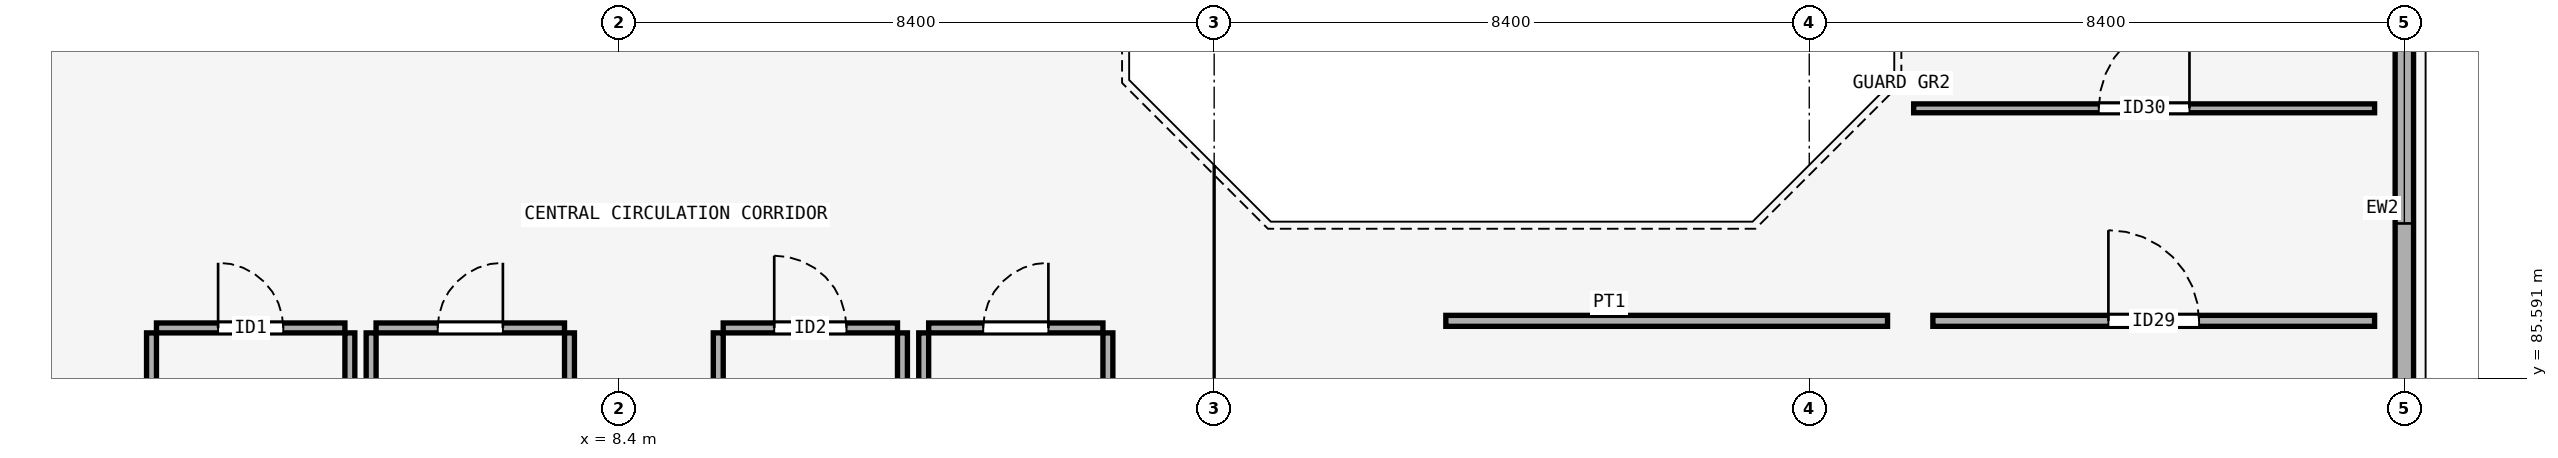
"""IFC4 building model, lengths in metres.
Left out: names, types, materials, properties, quantities, classifications, styles, units other than length and angle.
Written with IfcOpenShell. Run it as: python <this file> out.ifc"""

import sys

from ifc_helpers import new_model, si_unit, direction, frame, frame_2d, origin, place, context, subcontext, project, spatial, rectangle, extrude, element, fill, save


model = new_model("IFC4")
c1 = context("Model", 3, precision=1e-05, world=origin(), true_north=direction((0.0, 1.0)))
c2 = subcontext(c1, "Body", "Model", "MODEL_VIEW")
j1 = project(units=[si_unit("LENGTHUNIT", "METRE"), si_unit("PLANEANGLEUNIT", "RADIAN")], contexts=[c1])
p1 = place(None, origin())
s1 = spatial("IfcSite", under=j1, at=p1, CompositionType="ELEMENT")
p2 = place(p1, origin())
s2 = spatial("IfcBuilding", under=s1, at=p2, CompositionType="ELEMENT")
p3 = place(p2, frame((0.0, 0.0, 32.4)))
s3 = spatial("IfcBuildingStorey", under=s2, at=p3, CompositionType="ELEMENT", Elevation=32.4)
p4 = place(p3, frame((33.6, 85.125, 0.0), z_axis=(0.0, 0.0, 1.0), x_axis=(0.0, 1.0, 0.0)))
e1 = element("IfcWall", 1, at=p4, inside=s3, PredefinedType="SOLIDWALL", context=c2, shape_type="SweptSolid", body=[
    extrude(rectangle(XDim=7.75, YDim=0.26, at=frame_2d((3.875, 0.0))), origin(), (0.0, 0.0, 1.0), 3.49),
])
p5 = place(p4, frame((2.65, 0.0, 0.95)))
e2 = element("IfcOpeningElement", 2, at=p5, cuts=e1, PredefinedType="OPENING", context=c2, shape_type="SweptSolid", body=[
    extrude(rectangle(XDim=2.45, YDim=1.85, at=frame_2d((1.225, 0.925))), frame((0.0, 0.14, 0.0), z_axis=(0.0, -1.0, 0.0), x_axis=(1.0, 0.0, 0.0)), (0.0, 0.0, 1.0), 0.28),
])
p6 = place(p3, frame((1.87, 86.3, 0.0), z_axis=(0.0, 0.0, 1.0), x_axis=(1.0, 0.0, 0.0)))
e3 = element("IfcWall", 3, at=p6, inside=s3, PredefinedType="PARTITIONING", context=c2, shape_type="SweptSolid", body=[
    extrude(rectangle(XDim=2.66, YDim=0.14, at=frame_2d((1.33, 0.0))), origin(), (0.0, 0.0, 1.0), 4.24),
])
p7 = place(p6, frame((0.87, 0.0, 0.0)))
e4 = element("IfcOpeningElement", 4, at=p7, cuts=e3, PredefinedType="OPENING", context=c2, shape_type="SweptSolid", body=[
    extrude(rectangle(XDim=0.92, YDim=2.12, at=frame_2d((0.46, 1.06))), frame((0.0, 0.08, 0.0), z_axis=(0.0, -1.0, 0.0), x_axis=(1.0, 0.0, 0.0)), (0.0, 0.0, 1.0), 0.16),
])
for number, where, z_axis, x_axis in (
    (5, (1.8, 83.87, 0.0), (0.0, 0.0, 1.0), (0.0, 1.0, 0.0)),
    (6, (4.6, 83.87, 0.0), (0.0, 0.0, 1.0), (0.0, 1.0, 0.0)),
):
    element("IfcWall", number, at=place(p3, frame(where, z_axis=z_axis, x_axis=x_axis)), inside=s3, PredefinedType="PARTITIONING", context=c2, shape_type="SweptSolid", body=[
        extrude(rectangle(XDim=2.36, YDim=0.14, at=frame_2d((1.18, 0.0))), origin(), (0.0, 0.0, 1.0), 3.49),
    ])
p8 = place(p3, frame((4.97, 86.3, 0.0), z_axis=(0.0, 0.0, 1.0), x_axis=(1.0, 0.0, 0.0)))
e7 = element("IfcWall", 7, at=p8, inside=s3, PredefinedType="PARTITIONING", context=c2, shape_type="SweptSolid", body=[
    extrude(rectangle(XDim=2.66, YDim=0.14, at=frame_2d((1.33, 0.0))), origin(), (0.0, 0.0, 1.0), 4.24),
])
p9 = place(p8, frame((0.87, 0.0, 0.0)))
e8 = element("IfcOpeningElement", 8, at=p9, cuts=e7, PredefinedType="OPENING", context=c2, shape_type="SweptSolid", body=[
    extrude(rectangle(XDim=0.92, YDim=2.12, at=frame_2d((0.46, 1.06))), frame((0.0, 0.08, 0.0), z_axis=(0.0, -1.0, 0.0), x_axis=(1.0, 0.0, 0.0)), (0.0, 0.0, 1.0), 0.16),
])
for number, where, z_axis, x_axis in (
    (9, (4.9, 83.87, 0.0), (0.0, 0.0, 1.0), (0.0, 1.0, 0.0)),
    (10, (7.7, 83.87, 0.0), (0.0, 0.0, 1.0), (0.0, 1.0, 0.0)),
):
    element("IfcWall", number, at=place(p3, frame(where, z_axis=z_axis, x_axis=x_axis)), inside=s3, PredefinedType="PARTITIONING", context=c2, shape_type="SweptSolid", body=[
        extrude(rectangle(XDim=2.36, YDim=0.14, at=frame_2d((1.18, 0.0))), origin(), (0.0, 0.0, 1.0), 3.49),
    ])
p10 = place(p3, frame((9.87, 86.3, 0.0), z_axis=(0.0, 0.0, 1.0), x_axis=(1.0, 0.0, 0.0)))
e11 = element("IfcWall", 11, at=p10, inside=s3, PredefinedType="PARTITIONING", context=c2, shape_type="SweptSolid", body=[
    extrude(rectangle(XDim=2.46, YDim=0.14, at=frame_2d((1.23, 0.0))), origin(), (0.0, 0.0, 1.0), 4.24),
])
p11 = place(p10, frame((0.72, 0.0, 0.0)))
e12 = element("IfcOpeningElement", 12, at=p11, cuts=e11, PredefinedType="OPENING", context=c2, shape_type="SweptSolid", body=[
    extrude(rectangle(XDim=1.02, YDim=2.15, at=frame_2d((0.51, 1.075))), frame((0.0, 0.08, 0.0), z_axis=(0.0, -1.0, 0.0), x_axis=(1.0, 0.0, 0.0)), (0.0, 0.0, 1.0), 0.16),
])
for number, where, z_axis, x_axis in (
    (13, (9.8, 83.87, 0.0), (0.0, 0.0, 1.0), (0.0, 1.0, 0.0)),
    (14, (12.4, 83.87, 0.0), (0.0, 0.0, 1.0), (0.0, 1.0, 0.0)),
):
    element("IfcWall", number, at=place(p3, frame(where, z_axis=z_axis, x_axis=x_axis)), inside=s3, PredefinedType="PARTITIONING", context=c2, shape_type="SweptSolid", body=[
        extrude(rectangle(XDim=2.36, YDim=0.14, at=frame_2d((1.18, 0.0))), origin(), (0.0, 0.0, 1.0), 3.49),
    ])
p12 = place(p3, frame((12.77, 86.3, 0.0), z_axis=(0.0, 0.0, 1.0), x_axis=(1.0, 0.0, 0.0)))
e15 = element("IfcWall", 15, at=p12, inside=s3, PredefinedType="PARTITIONING", context=c2, shape_type="SweptSolid", body=[
    extrude(rectangle(XDim=2.46, YDim=0.14, at=frame_2d((1.23, 0.0))), origin(), (0.0, 0.0, 1.0), 4.24),
])
p13 = place(p12, frame((0.77, 0.0, 0.0)))
e16 = element("IfcOpeningElement", 16, at=p13, cuts=e15, PredefinedType="OPENING", context=c2, shape_type="SweptSolid", body=[
    extrude(rectangle(XDim=0.92, YDim=2.12, at=frame_2d((0.46, 1.06))), frame((0.0, 0.08, 0.0), z_axis=(0.0, -1.0, 0.0), x_axis=(1.0, 0.0, 0.0)), (0.0, 0.0, 1.0), 0.16),
])
for number, where, z_axis, x_axis in (
    (17, (12.7, 83.87, 0.0), (0.0, 0.0, 1.0), (0.0, 1.0, 0.0)),
    (18, (15.3, 83.87, 0.0), (0.0, 0.0, 1.0), (0.0, 1.0, 0.0)),
):
    element("IfcWall", number, at=place(p3, frame(where, z_axis=z_axis, x_axis=x_axis)), inside=s3, PredefinedType="PARTITIONING", context=c2, shape_type="SweptSolid", body=[
        extrude(rectangle(XDim=2.36, YDim=0.14, at=frame_2d((1.18, 0.0))), origin(), (0.0, 0.0, 1.0), 3.49),
    ])
p14 = place(p3, frame((20.07, 86.4, 0.0), z_axis=(0.0, 0.0, 1.0), x_axis=(1.0, 0.0, 0.0)))
e19 = element("IfcWall", 19, at=p14, inside=s3, PredefinedType="PARTITIONING", context=c2, shape_type="SweptSolid", body=[
    extrude(rectangle(XDim=6.235, YDim=0.155, at=frame_2d((3.117, 0.0))), origin(), (0.0, 0.0, 1.0), 3.54),
])
p15 = place(p3, frame((26.945, 86.4, 0.0), z_axis=(0.0, 0.0, 1.0), x_axis=(1.0, 0.0, 0.0)))
e20 = element("IfcWall", 20, at=p15, inside=s3, PredefinedType="PARTITIONING", context=c2, shape_type="SweptSolid", body=[
    extrude(rectangle(XDim=6.235, YDim=0.155, at=frame_2d((3.117, 0.0))), origin(), (0.0, 0.0, 1.0), 4.24),
])
p16 = place(p15, frame((2.478, 0.0, 0.0)))
e21 = element("IfcOpeningElement", 21, at=p16, cuts=e20, PredefinedType="OPENING", context=c2, shape_type="SweptSolid", body=[
    extrude(rectangle(XDim=1.28, YDim=2.34, at=frame_2d((0.64, 1.17))), frame((0.0, 0.087, 0.0), z_axis=(0.0, -1.0, 0.0), x_axis=(1.0, 0.0, 0.0)), (0.0, 0.0, 1.0), 0.175),
])
p17 = place(p3, frame((26.674, 89.4, 0.0), z_axis=(0.0, 0.0, 1.0), x_axis=(1.0, 0.0, 0.0)))
e22 = element("IfcWall", 22, at=p17, inside=s3, PredefinedType="PARTITIONING", context=c2, shape_type="SweptSolid", body=[
    extrude(rectangle(XDim=6.506, YDim=0.125, at=frame_2d((3.253, 0.0))), origin(), (0.0, 0.0, 1.0), 4.24),
])
p18 = place(p17, frame((2.613, 0.0, 0.0)))
e23 = element("IfcOpeningElement", 23, at=p18, cuts=e22, PredefinedType="OPENING", context=c2, shape_type="SweptSolid", body=[
    extrude(rectangle(XDim=1.28, YDim=2.46, at=frame_2d((0.64, 1.23))), frame((0.0, 0.073, 0.0), z_axis=(0.0, -1.0, 0.0), x_axis=(1.0, 0.0, 0.0)), (0.0, 0.0, 1.0), 0.145),
])
p19 = place(p5, origin())
e24 = element("IfcWindow", 24, at=p19, inside=s3, PartitioningType="DOUBLE_PANEL_VERTICAL", PredefinedType="WINDOW", context=c2, shape_type="SweptSolid", body=[
    extrude(rectangle(XDim=2.45, YDim=1.85, at=frame_2d((1.225, 0.925))), frame((0.0, 0.03, 0.0), z_axis=(0.0, -1.0, 0.0), x_axis=(1.0, 0.0, 0.0)), (0.0, 0.0, 1.0), 0.06),
])
fill(e2, e24)
p20 = place(p7, origin())
e25 = element("IfcDoor", 25, at=p20, inside=s3, OperationType="SINGLE_SWING_LEFT", PredefinedType="DOOR", context=c2, shape_type="SweptSolid", body=[
    extrude(rectangle(XDim=0.92, YDim=2.12, at=frame_2d((0.46, 1.06))), frame((0.0, 0.025, 0.0), z_axis=(0.0, -1.0, 0.0), x_axis=(1.0, 0.0, 0.0)), (0.0, 0.0, 1.0), 0.05),
])
fill(e4, e25)
p21 = place(p9, origin())
e26 = element("IfcDoor", 26, at=p21, inside=s3, OperationType="SINGLE_SWING_RIGHT", PredefinedType="DOOR", context=c2, shape_type="SweptSolid", body=[
    extrude(rectangle(XDim=0.92, YDim=2.12, at=frame_2d((0.46, 1.06))), frame((0.0, 0.025, 0.0), z_axis=(0.0, -1.0, 0.0), x_axis=(1.0, 0.0, 0.0)), (0.0, 0.0, 1.0), 0.05),
])
fill(e8, e26)
p22 = place(p11, origin())
e27 = element("IfcDoor", 27, at=p22, inside=s3, OperationType="SINGLE_SWING_LEFT", PredefinedType="DOOR", context=c2, shape_type="SweptSolid", body=[
    extrude(rectangle(XDim=1.02, YDim=2.15, at=frame_2d((0.51, 1.075))), frame((0.0, 0.025, 0.0), z_axis=(0.0, -1.0, 0.0), x_axis=(1.0, 0.0, 0.0)), (0.0, 0.0, 1.0), 0.05),
])
fill(e12, e27)
p23 = place(p13, origin())
e28 = element("IfcDoor", 28, at=p23, inside=s3, OperationType="SINGLE_SWING_RIGHT", PredefinedType="DOOR", context=c2, shape_type="SweptSolid", body=[
    extrude(rectangle(XDim=0.92, YDim=2.12, at=frame_2d((0.46, 1.06))), frame((0.0, 0.025, 0.0), z_axis=(0.0, -1.0, 0.0), x_axis=(1.0, 0.0, 0.0)), (0.0, 0.0, 1.0), 0.05),
])
fill(e16, e28)
p24 = place(p16, origin())
e29 = element("IfcDoor", 29, at=p24, inside=s3, OperationType="SINGLE_SWING_LEFT", PredefinedType="DOOR", context=c2, shape_type="SweptSolid", body=[
    extrude(rectangle(XDim=1.28, YDim=2.34, at=frame_2d((0.64, 1.17))), frame((0.0, 0.025, 0.0), z_axis=(0.0, -1.0, 0.0), x_axis=(1.0, 0.0, 0.0)), (0.0, 0.0, 1.0), 0.05),
])
fill(e21, e29)
p25 = place(p18, origin())
e30 = element("IfcDoor", 30, at=p25, inside=s3, OperationType="SINGLE_SWING_RIGHT", PredefinedType="DOOR", context=c2, shape_type="SweptSolid", body=[
    extrude(rectangle(XDim=1.28, YDim=2.46, at=frame_2d((0.64, 1.23))), frame((0.0, 0.025, 0.0), z_axis=(0.0, -1.0, 0.0), x_axis=(1.0, 0.0, 0.0)), (0.0, 0.0, 1.0), 0.05),
])
fill(e23, e30)
save(model, sys.argv[1])
